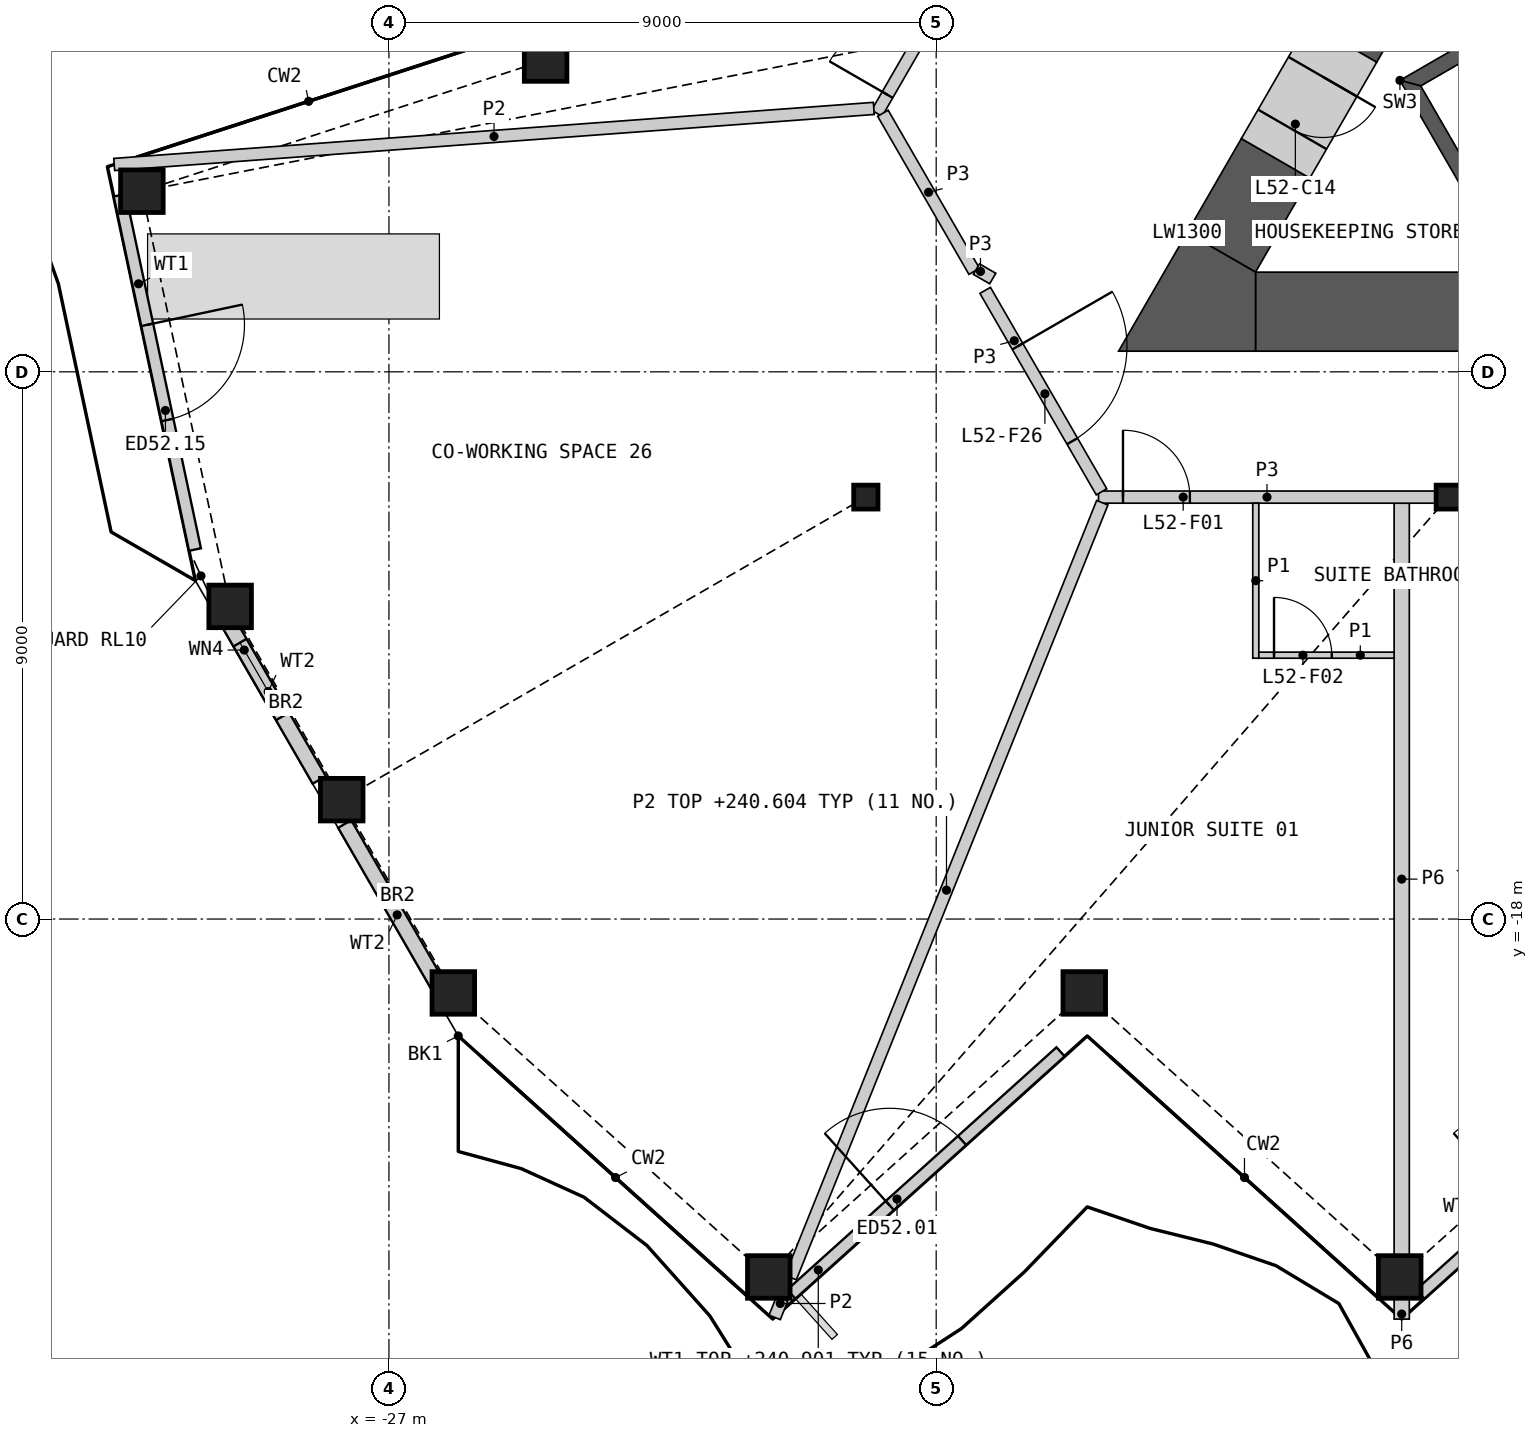
"""IFC4 building model, lengths in metres.
Left out: names, types, materials, properties, quantities, classifications, styles, units other than length and angle.
Written with IfcOpenShell. Run it as: python <this file> out.ifc"""

import sys

from ifc_helpers import new_model, si_unit, direction, frame, frame_2d, origin, origin_2d, place, context, subcontext, project, spatial, polyline, rectangle, hollow_rectangle, i_section, outline, extrude, element, fill, save


model = new_model("IFC4")
c1 = context("Model", 3, precision=1e-05, world=origin(), true_north=direction((0.0, 1.0)))
c2 = subcontext(c1, "Body", "Model", "MODEL_VIEW")
j1 = project(units=[si_unit("LENGTHUNIT", "METRE"), si_unit("PLANEANGLEUNIT", "RADIAN")], contexts=[c1])
p1 = place(None, origin())
s1 = spatial("IfcSite", under=j1, at=p1, CompositionType="ELEMENT")
p2 = place(p1, origin())
s2 = spatial("IfcBuilding", under=s1, at=p2, CompositionType="ELEMENT")
p3 = place(p2, frame((0.0, 0.0, 238.2)))
s3 = spatial("IfcBuildingStorey", under=s2, at=p3, CompositionType="ELEMENT", Elevation=238.2)
for number, where, z_axis, x_axis in (
    (1, (-25.941, -19.215, 0.0), (0.0, 0.0, 1.0), (1.0, 0.0, 0.0)),
    (2, (-20.753, -23.887, 0.0), (0.0, 0.0, 1.0), (1.0, 0.0, 0.0)),
    (3, (-15.565, -19.215, 0.0), (0.0, 0.0, 1.0), (1.0, 0.0, 0.0)),
    (4, (-10.376, -23.887, 0.0), (0.0, 0.0, 1.0), (1.0, 0.0, 0.0)),
    (5, (-24.423, -3.872, 0.0), (0.0, 0.0, 1.0), (1.0, 0.0, 0.0)),
    (6, (-31.063, -6.029, 0.0), (0.0, 0.0, 1.0), (1.0, 0.0, 0.0)),
    (7, (-29.612, -12.858, 0.0), (0.0, 0.0, 1.0), (1.0, 0.0, 0.0)),
    (8, (-27.776, -16.037, 0.0), (0.0, 0.0, 1.0), (1.0, 0.0, 0.0)),
):
    element("IfcColumn", number, at=place(p3, frame(where, z_axis=z_axis, x_axis=x_axis)), inside=s3, PredefinedType="COLUMN", context=c2, shape_type="SweptSolid", body=[
        extrude(hollow_rectangle(XDim=0.7, YDim=0.7, WallThickness=0.045, at=origin_2d()), origin(), (0.0, 0.0, 1.0), 3.6),
    ])
for number, where, z_axis, x_axis in (
    (9, (-19.157, -11.06, 0.0), (0.0, 0.0, 1.0), (1.0, 0.0, 0.0)),
    (10, (-9.578, -11.06, 0.0), (0.0, 0.0, 1.0), (1.0, 0.0, 0.0)),
):
    element("IfcColumn", number, at=place(p3, frame(where, z_axis=z_axis, x_axis=x_axis)), inside=s3, PredefinedType="COLUMN", context=c2, shape_type="SweptSolid", body=[
        extrude(i_section(OverallWidth=0.399, OverallDepth=0.393, WebThickness=0.023, FlangeThickness=0.037, at=origin_2d()), origin(), (0.0, 0.0, 1.0), 3.6),
    ])
p4 = place(p3, frame((-20.382, -24.17, 0.0), z_axis=(0.0, 0.0, 1.0), x_axis=(0.743161684399, 0.669111882155, 0.0)))
e11 = element("IfcWall", 11, at=p4, inside=s3, PredefinedType="SOLIDWALL", context=c2, shape_type="SweptSolid", body=[
    extrude(rectangle(XDim=5.958, YDim=0.2, at=frame_2d((2.979, 0.0))), origin(), (0.0, 0.0, 1.0), 2.701),
])
p5 = place(p4, frame((2.179, 0.0, 0.0)))
e12 = element("IfcOpeningElement", 12, at=p5, cuts=e11, PredefinedType="OPENING", context=c2, shape_type="SweptSolid", body=[
    extrude(rectangle(XDim=1.6, YDim=2.4, at=frame_2d((0.8, 1.2))), frame((0.0, 0.11, 0.0), z_axis=(0.0, -1.0, 0.0), x_axis=(1.0, 0.0, 0.0)), (0.0, 0.0, 1.0), 0.22),
])
p6 = place(p3, frame((-10.038, -24.17, 0.0), z_axis=(0.0, 0.0, 1.0), x_axis=(0.743143336638, 0.669132259878, 0.0)))
e13 = element("IfcWall", 13, at=p6, inside=s3, PredefinedType="SOLIDWALL", context=c2, shape_type="SweptSolid", body=[
    extrude(rectangle(XDim=5.958, YDim=0.2, at=frame_2d((2.979, 0.0))), origin(), (0.0, 0.0, 1.0), 2.701),
])
p7 = place(p6, frame((2.179, 0.0, 0.0)))
e14 = element("IfcOpeningElement", 14, at=p7, cuts=e13, PredefinedType="OPENING", context=c2, shape_type="SweptSolid", body=[
    extrude(rectangle(XDim=1.6, YDim=2.4, at=frame_2d((0.8, 1.2))), frame((0.0, 0.11, 0.0), z_axis=(0.0, -1.0, 0.0), x_axis=(1.0, 0.0, 0.0)), (0.0, 0.0, 1.0), 0.22),
])
p8 = place(p3, frame((-31.428, -6.095, 0.0), z_axis=(0.0, 0.0, 1.0), x_axis=(0.207939137045, -0.978141766456, 0.0)))
e15 = element("IfcWall", 15, at=p8, inside=s3, PredefinedType="SOLIDWALL", context=c2, shape_type="SweptSolid", body=[
    extrude(rectangle(XDim=5.957, YDim=0.2, at=frame_2d((2.979, 0.0))), origin(), (0.0, 0.0, 1.0), 2.701),
])
p9 = place(p8, frame((2.179, 0.0, 0.0)))
e16 = element("IfcOpeningElement", 16, at=p9, cuts=e15, PredefinedType="OPENING", context=c2, shape_type="SweptSolid", body=[
    extrude(rectangle(XDim=1.6, YDim=2.4, at=frame_2d((0.8, 1.2))), frame((0.0, 0.11, 0.0), z_axis=(0.0, -1.0, 0.0), x_axis=(1.0, 0.0, 0.0)), (0.0, 0.0, 1.0), 0.22),
])
p10 = place(p3, frame((-29.825, -12.805, 0.0), z_axis=(0.0, 0.0, 1.0), x_axis=(0.500003693016, -0.86602327161, 0.0)))
e17 = element("IfcWall", 17, at=p10, inside=s3, PredefinedType="SOLIDWALL", context=c2, shape_type="SweptSolid", body=[
    extrude(rectangle(XDim=3.356, YDim=0.25, at=frame_2d((1.678, 0.0))), origin(), (0.0, 0.0, 1.0), 2.701),
])
p11 = place(p10, frame((0.75, 0.0, 1.8)))
e18 = element("IfcOpeningElement", 18, at=p11, cuts=e17, PredefinedType="OPENING", context=c2, shape_type="SweptSolid", body=[
    extrude(rectangle(XDim=1.4, YDim=0.7, at=frame_2d((0.7, 0.35))), frame((0.0, 0.135, 0.0), z_axis=(0.0, -1.0, 0.0), x_axis=(1.0, 0.0, 0.0)), (0.0, 0.0, 1.0), 0.27),
])
p12 = place(p3, frame((-27.728, -16.437, 0.0), z_axis=(0.0, 0.0, 1.0), x_axis=(0.499987726745, -0.866032489635, 0.0)))
e19 = element("IfcWall", 19, at=p12, inside=s3, PredefinedType="SOLIDWALL", context=c2, shape_type="SweptSolid", body=[
    extrude(rectangle(XDim=3.452, YDim=0.25, at=frame_2d((1.726, 0.0))), origin(), (0.0, 0.0, 1.0), 2.701),
])
p13 = place(p3, origin())
e20 = element("IfcWall", 20, at=p13, inside=s3, PredefinedType="SHEAR", context=c2, shape_type="SweptSolid", body=[
    extrude(outline(polyline([(-5.307, -1.281), (-10.374, -4.206), (-10.032, -4.298), (-5.182, -1.498), (-5.307, -1.281)])), origin(), (0.0, 0.0, 1.0), 3.25),
])
p14 = place(p3, origin())
e21 = element("IfcWall", 21, at=p14, inside=s3, PredefinedType="SHEAR", context=c2, shape_type="SweptSolid", body=[
    extrude(outline(polyline([(-10.374, -4.206), (-8.83, -6.881), (-8.738, -6.539), (-10.032, -4.298), (-10.374, -4.206)])), origin(), (0.0, 0.0, 1.0), 3.25),
])
p15 = place(p3, frame((-12.748, -8.01, 0.0), z_axis=(0.0, 0.0, 1.0), x_axis=(1.0, 0.0, 0.0)))
e22 = element("IfcWall", 22, at=p15, inside=s3, PredefinedType="SHEAR", context=c2, shape_type="SweptSolid", body=[
    extrude(rectangle(XDim=25.497, YDim=1.3, at=frame_2d((12.748, 0.0))), origin(), (0.0, 0.0, 1.0), 3.25),
])
p16 = place(p3, frame((-9.137, 0.195, 0.0), z_axis=(0.0, 0.0, 1.0), x_axis=(-0.499985697398, -0.866033661238, 0.0)))
e23 = element("IfcWall", 23, at=p16, inside=s3, PredefinedType="SHEAR", context=c2, shape_type="SweptSolid", body=[
    extrude(rectangle(XDim=4.362, YDim=1.3, at=frame_2d((2.181, 0.0))), origin(), (0.0, 0.0, 1.0), 3.25),
])
p17 = place(p3, frame((-12.418, -5.488, 0.0), z_axis=(0.0, 0.0, 1.0), x_axis=(-0.499931460552, -0.866064971437, 0.0)))
e24 = element("IfcWall", 24, at=p17, inside=s3, PredefinedType="SHEAR", context=c2, shape_type="SweptSolid", body=[
    extrude(rectangle(XDim=1.786, YDim=1.3, at=frame_2d((0.893, 0.0))), origin(), (0.0, 0.0, 1.0), 3.25),
])
p18 = place(p3, origin())
e25 = element("IfcWall", 25, at=p18, inside=s3, PredefinedType="SHEAR", context=c2, shape_type="SweptSolid", body=[
    extrude(outline(polyline([(-13.874, -6.71), (-12.748, -7.36), (-12.748, -8.66), (-15.0, -8.66), (-13.874, -6.71)])), origin(), (0.0, 0.0, 1.0), 3.25),
])
p19 = place(p3, frame((-11.318, -3.583, 0.0), z_axis=(0.0, 0.0, 1.0), x_axis=(-0.50002983664, -0.866008176907, 0.0)))
e26 = element("IfcWall", 26, at=p19, inside=s3, PredefinedType="SHEAR", context=c2, shape_type="SweptSolid", body=[
    extrude(rectangle(XDim=2.2, YDim=1.3, at=frame_2d((1.1, 0.0))), origin(), (0.0, 0.0, 1.0), 3.25),
])
p20 = place(p19, frame((0.65, 0.0, 0.0)))
e27 = element("IfcOpeningElement", 27, at=p20, cuts=e26, PredefinedType="OPENING", context=c2, shape_type="SweptSolid", body=[
    extrude(rectangle(XDim=1.0, YDim=2.1, at=frame_2d((0.5, 1.05))), frame((0.0, 0.66, 0.0), z_axis=(0.0, -1.0, 0.0), x_axis=(1.0, 0.0, 0.0)), (0.0, 0.0, 1.0), 1.32),
])
p21 = place(p3, frame((-18.976, -4.747, 0.0), z_axis=(0.0, 0.0, 1.0), x_axis=(0.499999852422, 0.866025488988, 0.0)))
e28 = element("IfcWall", 28, at=p21, inside=s3, PredefinedType="PARTITIONING", context=c2, shape_type="SweptSolid", body=[
    extrude(rectangle(XDim=27.198, YDim=0.2, at=frame_2d((13.599, 0.0))), origin(), (0.0, 0.0, 1.0), 3.25),
])
p22 = place(p21, frame((25.346, 0.0, 0.0)))
e29 = element("IfcOpeningElement", 29, at=p22, cuts=e28, PredefinedType="OPENING", context=c2, shape_type="SweptSolid", body=[
    extrude(rectangle(XDim=1.1, YDim=2.1, at=frame_2d((0.55, 1.05))), frame((0.0, 0.11, 0.0), z_axis=(0.0, -1.0, 0.0), x_axis=(1.0, 0.0, 0.0)), (0.0, 0.0, 1.0), 0.22),
])
p23 = place(p21, frame((16.713, 0.0, 0.0)))
e30 = element("IfcOpeningElement", 30, at=p23, cuts=e28, PredefinedType="OPENING", context=c2, shape_type="SweptSolid", body=[
    extrude(rectangle(XDim=1.1, YDim=2.1, at=frame_2d((0.55, 1.05))), frame((0.0, 0.11, 0.0), z_axis=(0.0, -1.0, 0.0), x_axis=(1.0, 0.0, 0.0)), (0.0, 0.0, 1.0), 0.22),
])
p24 = place(p21, frame((0.35, 0.0, 0.0)))
e31 = element("IfcOpeningElement", 31, at=p24, cuts=e28, PredefinedType="OPENING", context=c2, shape_type="SweptSolid", body=[
    extrude(rectangle(XDim=1.1, YDim=2.1, at=frame_2d((0.55, 1.05))), frame((0.0, 0.11, 0.0), z_axis=(0.0, -1.0, 0.0), x_axis=(1.0, 0.0, 0.0)), (0.0, 0.0, 1.0), 0.22),
])
p25 = place(p3, frame((-10.344, -23.527, 0.0), z_axis=(0.0, 0.0, 1.0), x_axis=(0.0, 1.0, 0.0)))
e32 = element("IfcWall", 32, at=p25, inside=s3, PredefinedType="PARTITIONING", context=c2, shape_type="SweptSolid", body=[
    extrude(rectangle(XDim=12.366, YDim=0.25, at=frame_2d((6.183, 0.0))), origin(), (0.0, 0.0, 1.0), 2.404),
])
p26 = place(p3, frame((-15.331, -11.06, 0.0), z_axis=(0.0, 0.0, 1.0), x_axis=(1.0, 0.0, 0.0)))
e33 = element("IfcWall", 33, at=p26, inside=s3, PredefinedType="PARTITIONING", context=c2, shape_type="SweptSolid", body=[
    extrude(rectangle(XDim=5.543, YDim=0.2, at=frame_2d((2.771, 0.0))), origin(), (0.0, 0.0, 1.0), 3.25),
])
p27 = place(p26, frame((0.403, 0.0, 0.0)))
e34 = element("IfcOpeningElement", 34, at=p27, cuts=e33, PredefinedType="OPENING", context=c2, shape_type="SweptSolid", body=[
    extrude(rectangle(XDim=1.1, YDim=2.1, at=frame_2d((0.55, 1.05))), frame((0.0, 0.11, 0.0), z_axis=(0.0, -1.0, 0.0), x_axis=(1.0, 0.0, 0.0)), (0.0, 0.0, 1.0), 0.22),
])
p28 = place(p3, frame((-17.194, -7.66, 0.0), z_axis=(0.0, 0.0, 1.0), x_axis=(0.499989446428, -0.866031496806, 0.0)))
e35 = element("IfcWall", 35, at=p28, inside=s3, PredefinedType="PARTITIONING", context=c2, shape_type="SweptSolid", body=[
    extrude(rectangle(XDim=3.826, YDim=0.2, at=frame_2d((1.913, 0.0))), origin(), (0.0, 0.0, 1.0), 3.25),
])
p29 = place(p28, frame((1.064, 0.0, 0.0)))
e36 = element("IfcOpeningElement", 36, at=p29, cuts=e35, PredefinedType="OPENING", context=c2, shape_type="SweptSolid", body=[
    extrude(rectangle(XDim=1.8, YDim=2.1, at=frame_2d((0.9, 1.05))), frame((0.0, 0.11, 0.0), z_axis=(0.0, -1.0, 0.0), x_axis=(1.0, 0.0, 0.0)), (0.0, 0.0, 1.0), 0.22),
])
p30 = place(p3, frame((-18.876, -4.747, 0.0), z_axis=(0.0, 0.0, 1.0), x_axis=(0.499952404951, -0.866052881055, 0.0)))
e37 = element("IfcWall", 37, at=p30, inside=s3, PredefinedType="PARTITIONING", context=c2, shape_type="SweptSolid", body=[
    extrude(rectangle(XDim=3.002, YDim=0.2, at=frame_2d((1.501, 0.0))), origin(), (0.0, 0.0, 1.0), 3.25),
])
p31 = place(p3, frame((-17.338, -7.31, 0.0), z_axis=(0.0, 0.0, 1.0), x_axis=(0.866054481515, -0.499949632511, 0.0)))
e38 = element("IfcWall", 38, at=p31, inside=s3, PredefinedType="PARTITIONING", context=c2, shape_type="SweptSolid", body=[
    extrude(rectangle(XDim=0.31, YDim=0.2, at=frame_2d((0.155, 0.0))), origin(), (0.0, 0.0, 1.0), 3.25),
])
p32 = place(p3, frame((-10.344, -24.58, 0.0), z_axis=(0.0, 0.0, 1.0), x_axis=(0.0, 1.0, 0.0)))
e39 = element("IfcWall", 39, at=p32, inside=s3, PredefinedType="PARTITIONING", context=c2, shape_type="SweptSolid", body=[
    extrude(rectangle(XDim=0.333, YDim=0.25, at=frame_2d((0.167, 0.0))), origin(), (0.0, 0.0, 1.0), 2.404),
])
p33 = place(p3, frame((-20.393, -23.897, 0.0), z_axis=(0.0, 0.0, 1.0), x_axis=(0.373096979113, 0.927792349708, 0.0)))
e40 = element("IfcWall", 40, at=p33, inside=s3, PredefinedType="PARTITIONING", context=c2, shape_type="SweptSolid", body=[
    extrude(rectangle(XDim=13.736, YDim=0.2, at=frame_2d((6.868, 0.0))), origin(), (0.0, 0.0, 1.0), 2.404),
])
p34 = place(p3, frame((-31.518, -5.59, 0.0), z_axis=(0.0, 0.0, 1.0), x_axis=(0.99728681237, 0.073613951618, 0.0)))
e41 = element("IfcWall", 41, at=p34, inside=s3, PredefinedType="PARTITIONING", context=c2, shape_type="SweptSolid", body=[
    extrude(rectangle(XDim=12.526, YDim=0.2, at=frame_2d((6.263, 0.0))), origin(), (0.0, 0.0, 1.0), 2.404),
])
p35 = place(p3, frame((-20.656, -24.551, 0.0), z_axis=(0.0, 0.0, 1.0), x_axis=(0.372801499492, 0.927911117498, 0.0)))
e42 = element("IfcWall", 42, at=p35, inside=s3, PredefinedType="PARTITIONING", context=c2, shape_type="SweptSolid", body=[
    extrude(rectangle(XDim=0.328, YDim=0.2, at=frame_2d((0.164, 0.0))), origin(), (0.0, 0.0, 1.0), 2.404),
])
p36 = place(p3, frame((-12.744, -13.71, 0.0), z_axis=(0.0, 0.0, 1.0), x_axis=(0.0, 1.0, 0.0)))
e43 = element("IfcWall", 43, at=p36, inside=s3, PredefinedType="PARTITIONING", context=c2, shape_type="SweptSolid", body=[
    extrude(rectangle(XDim=2.55, YDim=0.1, at=frame_2d((1.275, 0.0))), origin(), (0.0, 0.0, 1.0), 2.404),
])
p37 = place(p3, frame((-12.694, -13.66, 0.0), z_axis=(0.0, 0.0, 1.0), x_axis=(1.0, 0.0, 0.0)))
e44 = element("IfcWall", 44, at=p37, inside=s3, PredefinedType="PARTITIONING", context=c2, shape_type="SweptSolid", body=[
    extrude(rectangle(XDim=2.225, YDim=0.1, at=frame_2d((1.113, 0.0))), origin(), (0.0, 0.0, 1.0), 2.404),
])
p38 = place(p37, frame((0.25, 0.0, 0.0)))
e45 = element("IfcOpeningElement", 45, at=p38, cuts=e44, PredefinedType="OPENING", context=c2, shape_type="SweptSolid", body=[
    extrude(rectangle(XDim=0.95, YDim=2.1, at=frame_2d((0.475, 1.05))), frame((0.0, 0.06, 0.0), z_axis=(0.0, -1.0, 0.0), x_axis=(1.0, 0.0, 0.0)), (0.0, 0.0, 1.0), 0.12),
])
p39 = place(p5, origin())
e46 = element("IfcDoor", 46, at=p39, inside=s3, OperationType="DOUBLE_DOOR_SINGLE_SWING", PredefinedType="DOOR", context=c2, shape_type="SweptSolid", body=[
    extrude(rectangle(XDim=1.6, YDim=2.4, at=frame_2d((0.8, 1.2))), frame((0.0, 0.025, 0.0), z_axis=(0.0, -1.0, 0.0), x_axis=(1.0, 0.0, 0.0)), (0.0, 0.0, 1.0), 0.05),
])
fill(e12, e46)
p40 = place(p9, origin())
e47 = element("IfcDoor", 47, at=p40, inside=s3, OperationType="DOUBLE_DOOR_SINGLE_SWING", PredefinedType="DOOR", context=c2, shape_type="SweptSolid", body=[
    extrude(rectangle(XDim=1.6, YDim=2.4, at=frame_2d((0.8, 1.2))), frame((0.0, 0.025, 0.0), z_axis=(0.0, -1.0, 0.0), x_axis=(1.0, 0.0, 0.0)), (0.0, 0.0, 1.0), 0.05),
])
fill(e16, e47)
p41 = place(p11, origin())
e48 = element("IfcWindow", 48, at=p41, inside=s3, PartitioningType="SINGLE_PANEL", PredefinedType="WINDOW", context=c2, shape_type="SweptSolid", body=[
    extrude(rectangle(XDim=1.4, YDim=0.7, at=frame_2d((0.7, 0.35))), frame((0.0, 0.03, 0.0), z_axis=(0.0, -1.0, 0.0), x_axis=(1.0, 0.0, 0.0)), (0.0, 0.0, 1.0), 0.06),
])
fill(e18, e48)
p42 = place(p20, origin())
e49 = element("IfcDoor", 49, at=p42, inside=s3, OperationType="SINGLE_SWING_LEFT", PredefinedType="DOOR", context=c2, shape_type="SweptSolid", body=[
    extrude(rectangle(XDim=1.0, YDim=2.1, at=frame_2d((0.5, 1.05))), frame((0.0, 0.405, 0.0), z_axis=(0.0, -1.0, 0.0), x_axis=(1.0, 0.0, 0.0)), (0.0, 0.0, 1.0), 0.05),
])
fill(e27, e49)
p43 = place(p27, origin())
e50 = element("IfcDoor", 50, at=p43, inside=s3, OperationType="SINGLE_SWING_LEFT", PredefinedType="DOOR", context=c2, shape_type="SweptSolid", body=[
    extrude(rectangle(XDim=1.1, YDim=2.1, at=frame_2d((0.55, 1.05))), frame((0.0, 0.025, 0.0), z_axis=(0.0, -1.0, 0.0), x_axis=(1.0, 0.0, 0.0)), (0.0, 0.0, 1.0), 0.05),
])
fill(e34, e50)
p44 = place(p38, origin())
e51 = element("IfcDoor", 51, at=p44, inside=s3, OperationType="SINGLE_SWING_LEFT", PredefinedType="DOOR", context=c2, shape_type="SweptSolid", body=[
    extrude(rectangle(XDim=0.95, YDim=2.1, at=frame_2d((0.475, 1.05))), frame((0.0, 0.025, 0.0), z_axis=(0.0, -1.0, 0.0), x_axis=(1.0, 0.0, 0.0)), (0.0, 0.0, 1.0), 0.05),
])
fill(e45, e51)
p45 = place(p24, origin())
e52 = element("IfcDoor", 52, at=p45, inside=s3, OperationType="SINGLE_SWING_LEFT", PredefinedType="DOOR", context=c2, shape_type="SweptSolid", body=[
    extrude(rectangle(XDim=1.1, YDim=2.1, at=frame_2d((0.55, 1.05))), frame((0.0, 0.025, 0.0), z_axis=(0.0, -1.0, 0.0), x_axis=(1.0, 0.0, 0.0)), (0.0, 0.0, 1.0), 0.05),
])
fill(e31, e52)
p46 = place(p29, origin())
e53 = element("IfcDoor", 53, at=p46, inside=s3, OperationType="DOUBLE_DOOR_SINGLE_SWING", PredefinedType="DOOR", context=c2, shape_type="SweptSolid", body=[
    extrude(rectangle(XDim=1.8, YDim=2.1, at=frame_2d((0.9, 1.05))), frame((0.0, 0.025, 0.0), z_axis=(0.0, -1.0, 0.0), x_axis=(1.0, 0.0, 0.0)), (0.0, 0.0, 1.0), 0.05),
])
fill(e36, e53)
save(model, sys.argv[1])
